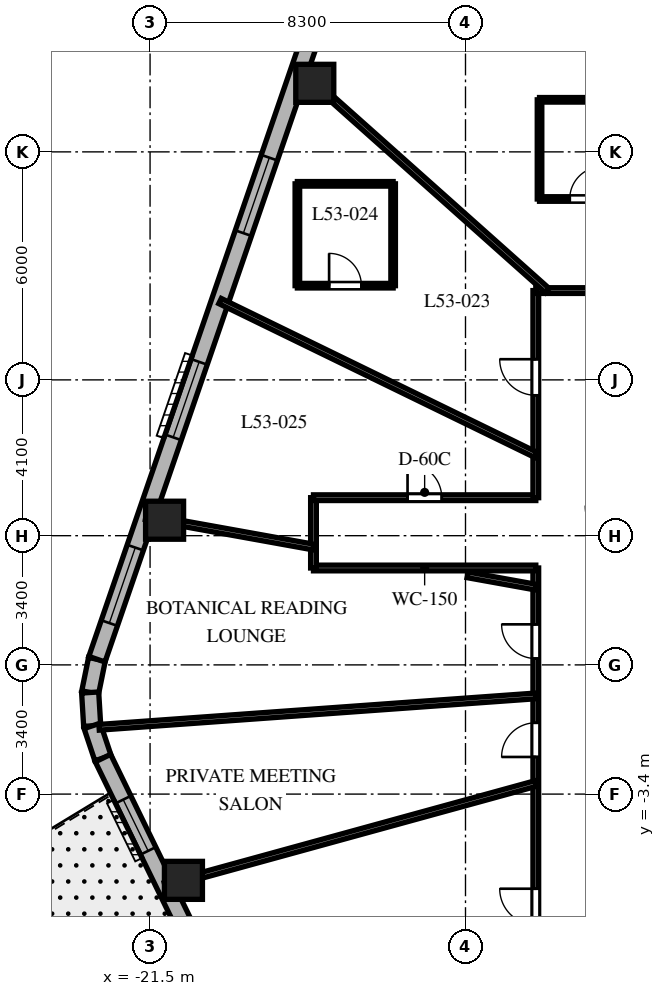
"""IFC4 building model, lengths in metres.
Left out: names, types, materials, properties, quantities, classifications, styles, units other than length and angle.
Written with IfcOpenShell. Run it as: python <this file> out.ifc"""

import sys

from ifc_helpers import new_model, si_unit, direction, frame, frame_2d, origin, origin_2d, place, context, subcontext, project, spatial, rectangle, extrude, element, fill, save


model = new_model("IFC4")
c1 = context("Model", 3, precision=1e-05, world=origin(), true_north=direction((0.0, 1.0)))
c2 = subcontext(c1, "Body", "Model", "MODEL_VIEW")
j1 = project(units=[si_unit("LENGTHUNIT", "METRE"), si_unit("PLANEANGLEUNIT", "RADIAN")], contexts=[c1])
p1 = place(None, origin())
s1 = spatial("IfcSite", under=j1, at=p1, CompositionType="ELEMENT")
p2 = place(p1, origin())
s2 = spatial("IfcBuilding", under=s1, at=p2, CompositionType="ELEMENT")
p3 = place(p2, frame((0.0, 0.0, 214.1)))
s3 = spatial("IfcBuildingStorey", under=s2, at=p3, CompositionType="ELEMENT", Elevation=214.1)
for number, where, z_axis, x_axis in (
    (1, (-17.166, 15.304, 0.0), (0.0, 0.0, 1.0), (1.0, 0.0, 0.0)),
    (2, (-21.118, 3.807, 0.0), (0.0, 0.0, 1.0), (1.0, 0.0, 0.0)),
    (3, (-20.622, -5.67, 0.0), (0.0, 0.0, 1.0), (1.0, 0.0, 0.0)),
):
    element("IfcColumn", number, at=place(p3, frame(where, z_axis=z_axis, x_axis=x_axis)), inside=s3, PredefinedType="COLUMN", context=c2, shape_type="SweptSolid", body=[
        extrude(rectangle(XDim=1.0, YDim=1.0, at=origin_2d()), origin(), (0.0, 0.0, 1.0), 3.8),
    ])
p4 = place(p3, frame((-22.898, 0.15, 0.0), z_axis=(0.0, 0.0, 1.0), x_axis=(-0.199055826889, -0.979988151858, 0.0)))
e4 = element("IfcWall", 4, at=p4, inside=s3, PredefinedType="SOLIDWALL", context=c2, shape_type="SweptSolid", body=[
    extrude(rectangle(XDim=0.894, YDim=0.45, at=frame_2d((0.447, 0.0))), origin(), (0.0, 0.0, 1.0), 3.5),
])
p5 = place(p3, frame((-23.076, -0.727, 0.0), z_axis=(0.0, 0.0, 1.0), x_axis=(0.060805222108, -0.998149650586, 0.0)))
e5 = element("IfcWall", 5, at=p5, inside=s3, PredefinedType="SOLIDWALL", context=c2, shape_type="SweptSolid", body=[
    extrude(rectangle(XDim=0.879, YDim=0.45, at=frame_2d((0.44, 0.0))), origin(), (0.0, 0.0, 1.0), 3.5),
])
p6 = place(p3, frame((-23.023, -1.604, 0.0), z_axis=(0.0, 0.0, 1.0), x_axis=(0.316801227695, -0.948491951537, 0.0)))
e6 = element("IfcWall", 6, at=p6, inside=s3, PredefinedType="SOLIDWALL", context=c2, shape_type="SweptSolid", body=[
    extrude(rectangle(XDim=0.894, YDim=0.45, at=frame_2d((0.447, 0.0))), origin(), (0.0, 0.0, 1.0), 3.5),
])
p7 = place(p3, frame((-16.324, 19.275, 0.0), z_axis=(0.0, 0.0, 1.0), x_axis=(-0.325083142304, -0.945685439557, 0.0)))
e7 = element("IfcWall", 7, at=p7, inside=s3, PredefinedType="SOLIDWALL", context=c2, shape_type="SweptSolid", body=[
    extrude(rectangle(XDim=20.224, YDim=0.45, at=frame_2d((10.112, 0.0))), origin(), (0.0, 0.0, 1.0), 3.5),
])
p8 = place(p7, frame((0.953, 0.0, 0.8)))
e8 = element("IfcOpeningElement", 8, at=p8, cuts=e7, PredefinedType="OPENING", context=c2, shape_type="SweptSolid", body=[
    extrude(rectangle(XDim=2.1, YDim=1.85, at=frame_2d((1.05, 0.925))), frame((0.0, 0.235, 0.0), z_axis=(0.0, -1.0, 0.0), x_axis=(1.0, 0.0, 0.0)), (0.0, 0.0, 1.0), 0.47),
])
p9 = place(p7, frame((6.268, 0.0, 0.8)))
e9 = element("IfcOpeningElement", 9, at=p9, cuts=e7, PredefinedType="OPENING", context=c2, shape_type="SweptSolid", body=[
    extrude(rectangle(XDim=2.1, YDim=1.85, at=frame_2d((1.05, 0.925))), frame((0.0, 0.235, 0.0), z_axis=(0.0, -1.0, 0.0), x_axis=(1.0, 0.0, 0.0)), (0.0, 0.0, 1.0), 0.47),
])
p10 = place(p7, frame((11.95, 0.0, 0.8)))
e10 = element("IfcOpeningElement", 10, at=p10, cuts=e7, PredefinedType="OPENING", context=c2, shape_type="SweptSolid", body=[
    extrude(rectangle(XDim=2.1, YDim=1.85, at=frame_2d((1.05, 0.925))), frame((0.0, 0.235, 0.0), z_axis=(0.0, -1.0, 0.0), x_axis=(1.0, 0.0, 0.0)), (0.0, 0.0, 1.0), 0.47),
])
p11 = place(p7, frame((17.118, 0.0, 0.8)))
e11 = element("IfcOpeningElement", 11, at=p11, cuts=e7, PredefinedType="OPENING", context=c2, shape_type="SweptSolid", body=[
    extrude(rectangle(XDim=2.1, YDim=1.85, at=frame_2d((1.05, 0.925))), frame((0.0, 0.235, 0.0), z_axis=(0.0, -1.0, 0.0), x_axis=(1.0, 0.0, 0.0)), (0.0, 0.0, 1.0), 0.47),
])
p12 = place(p3, frame((-22.74, -2.452, 0.0), z_axis=(0.0, 0.0, 1.0), x_axis=(0.437753424814, -0.899095066755, 0.0)))
e12 = element("IfcWall", 12, at=p12, inside=s3, PredefinedType="SOLIDWALL", context=c2, shape_type="SweptSolid", body=[
    extrude(rectangle(XDim=19.137, YDim=0.45, at=frame_2d((9.569, 0.0))), origin(), (0.0, 0.0, 1.0), 3.5),
])
p13 = place(p12, frame((4.763, 0.0, 0.0)))
e13 = element("IfcOpeningElement", 13, at=p13, cuts=e12, PredefinedType="OPENING", context=c2, shape_type="SweptSolid", body=[
    extrude(rectangle(XDim=0.95, YDim=2.15, at=frame_2d((0.475, 1.075))), frame((0.0, 0.235, 0.0), z_axis=(0.0, -1.0, 0.0), x_axis=(1.0, 0.0, 0.0)), (0.0, 0.0, 1.0), 0.47),
])
p14 = place(p12, frame((1.216, 0.0, 0.8)))
e14 = element("IfcOpeningElement", 14, at=p14, cuts=e12, PredefinedType="OPENING", context=c2, shape_type="SweptSolid", body=[
    extrude(rectangle(XDim=1.5, YDim=1.8, at=frame_2d((0.75, 0.9))), frame((0.0, 0.235, 0.0), z_axis=(0.0, -1.0, 0.0), x_axis=(1.0, 0.0, 0.0)), (0.0, 0.0, 1.0), 0.47),
])
p15 = place(p12, frame((8.87, 0.0, 0.8)))
e15 = element("IfcOpeningElement", 15, at=p15, cuts=e12, PredefinedType="OPENING", context=c2, shape_type="SweptSolid", body=[
    extrude(rectangle(XDim=1.5, YDim=1.8, at=frame_2d((0.75, 0.9))), frame((0.0, 0.235, 0.0), z_axis=(0.0, -1.0, 0.0), x_axis=(1.0, 0.0, 0.0)), (0.0, 0.0, 1.0), 0.47),
])
p16 = place(p12, frame((16.473, 0.0, 0.8)))
e16 = element("IfcOpeningElement", 16, at=p16, cuts=e12, PredefinedType="OPENING", context=c2, shape_type="SweptSolid", body=[
    extrude(rectangle(XDim=1.5, YDim=1.8, at=frame_2d((0.75, 0.9))), frame((0.0, 0.235, 0.0), z_axis=(0.0, -1.0, 0.0), x_axis=(1.0, 0.0, 0.0)), (0.0, 0.0, 1.0), 0.47),
])
p17 = place(p3, frame((-11.35, -9.85, 0.0), z_axis=(0.0, 0.0, 1.0), x_axis=(0.0, 1.0, 0.0)))
e17 = element("IfcWall", 17, at=p17, inside=s3, PredefinedType="PARTITIONING", context=c2, shape_type="SweptSolid", body=[
    extrude(rectangle(XDim=12.4, YDim=0.15, at=frame_2d((6.2, 0.0))), origin(), (0.0, 0.0, 1.0), 2.99),
])
p18 = place(p17, frame((10.017, 0.0, 0.0)))
e18 = element("IfcOpeningElement", 18, at=p18, cuts=e17, PredefinedType="OPENING", context=c2, shape_type="SweptSolid", body=[
    extrude(rectangle(XDim=0.9, YDim=2.03, at=frame_2d((0.45, 1.015))), frame((0.0, 0.085, 0.0), z_axis=(0.0, -1.0, 0.0), x_axis=(1.0, 0.0, 0.0)), (0.0, 0.0, 1.0), 0.17),
])
p19 = place(p17, frame((7.427, 0.0, 0.0)))
e19 = element("IfcOpeningElement", 19, at=p19, cuts=e17, PredefinedType="OPENING", context=c2, shape_type="SweptSolid", body=[
    extrude(rectangle(XDim=0.9, YDim=2.03, at=frame_2d((0.45, 1.015))), frame((0.0, 0.085, 0.0), z_axis=(0.0, -1.0, 0.0), x_axis=(1.0, 0.0, 0.0)), (0.0, 0.0, 1.0), 0.17),
])
p20 = place(p17, frame((3.01, 0.0, 0.0)))
e20 = element("IfcOpeningElement", 20, at=p20, cuts=e17, PredefinedType="OPENING", context=c2, shape_type="SweptSolid", body=[
    extrude(rectangle(XDim=0.95, YDim=2.03, at=frame_2d((0.475, 1.015))), frame((0.0, 0.085, 0.0), z_axis=(0.0, -1.0, 0.0), x_axis=(1.0, 0.0, 0.0)), (0.0, 0.0, 1.0), 0.17),
])
p21 = place(p3, frame((-11.35, 2.55, 0.0), z_axis=(0.0, 0.0, 1.0), x_axis=(-1.0, 0.0, 0.0)))
e21 = element("IfcWall", 21, at=p21, inside=s3, PredefinedType="PARTITIONING", context=c2, shape_type="SweptSolid", body=[
    extrude(rectangle(XDim=5.85, YDim=0.15, at=frame_2d((2.925, 0.0))), origin(), (0.0, 0.0, 1.0), 2.94),
])
p22 = place(p3, frame((-17.2, 2.55, 0.0), z_axis=(0.0, 0.0, 1.0), x_axis=(0.0, 1.0, 0.0)))
e22 = element("IfcWall", 22, at=p22, inside=s3, PredefinedType="PARTITIONING", context=c2, shape_type="SweptSolid", body=[
    extrude(rectangle(XDim=1.85, YDim=0.15, at=frame_2d((0.925, 0.0))), origin(), (0.0, 0.0, 1.0), 2.94),
])
p23 = place(p3, frame((-17.2, 4.4, 0.0), z_axis=(0.0, 0.0, 1.0), x_axis=(1.0, 0.0, 0.0)))
e23 = element("IfcWall", 23, at=p23, inside=s3, PredefinedType="PARTITIONING", context=c2, shape_type="SweptSolid", body=[
    extrude(rectangle(XDim=5.85, YDim=0.15, at=frame_2d((2.925, 0.0))), origin(), (0.0, 0.0, 1.0), 2.94),
])
p24 = place(p23, frame((2.475, 0.0, 0.0)))
e24 = element("IfcOpeningElement", 24, at=p24, cuts=e23, PredefinedType="OPENING", context=c2, shape_type="SweptSolid", body=[
    extrude(rectangle(XDim=0.9, YDim=2.03, at=frame_2d((0.45, 1.015))), frame((0.0, 0.085, 0.0), z_axis=(0.0, -1.0, 0.0), x_axis=(1.0, 0.0, 0.0)), (0.0, 0.0, 1.0), 0.17),
])
p25 = place(p3, frame((-11.35, 4.4, 0.0), z_axis=(0.0, 0.0, 1.0), x_axis=(0.0, 1.0, 0.0)))
e25 = element("IfcWall", 25, at=p25, inside=s3, PredefinedType="PARTITIONING", context=c2, shape_type="SweptSolid", body=[
    extrude(rectangle(XDim=5.45, YDim=0.15, at=frame_2d((2.725, 0.0))), origin(), (0.0, 0.0, 1.0), 2.99),
])
p26 = place(p25, frame((2.694, 0.0, 0.0)))
e26 = element("IfcOpeningElement", 26, at=p26, cuts=e25, PredefinedType="OPENING", context=c2, shape_type="SweptSolid", body=[
    extrude(rectangle(XDim=0.95, YDim=2.03, at=frame_2d((0.475, 1.015))), frame((0.0, 0.085, 0.0), z_axis=(0.0, -1.0, 0.0), x_axis=(1.0, 0.0, 0.0)), (0.0, 0.0, 1.0), 0.17),
])
p27 = place(p3, frame((-11.35, 9.85, 0.0), z_axis=(0.0, 0.0, 1.0), x_axis=(1.0, 0.0, 0.0)))
e27 = element("IfcWall", 27, at=p27, inside=s3, PredefinedType="PARTITIONING", context=c2, shape_type="SweptSolid", body=[
    extrude(rectangle(XDim=10.43, YDim=0.15, at=frame_2d((5.215, 0.0))), origin(), (0.0, 0.0, 1.0), 2.99),
])
p28 = place(p27, frame((8.362, 0.0, 0.0)))
e28 = element("IfcOpeningElement", 28, at=p28, cuts=e27, PredefinedType="OPENING", context=c2, shape_type="SweptSolid", body=[
    extrude(rectangle(XDim=0.95, YDim=2.03, at=frame_2d((0.475, 1.015))), frame((0.0, 0.085, 0.0), z_axis=(0.0, -1.0, 0.0), x_axis=(1.0, 0.0, 0.0)), (0.0, 0.0, 1.0), 0.17),
])
p29 = place(p27, frame((3.396, 0.0, 0.0)))
e29 = element("IfcOpeningElement", 29, at=p29, cuts=e27, PredefinedType="OPENING", context=c2, shape_type="SweptSolid", body=[
    extrude(rectangle(XDim=0.95, YDim=2.03, at=frame_2d((0.475, 1.015))), frame((0.0, 0.085, 0.0), z_axis=(0.0, -1.0, 0.0), x_axis=(1.0, 0.0, 0.0)), (0.0, 0.0, 1.0), 0.17),
])
p30 = place(p3, frame((-11.048, 9.85, 0.0), z_axis=(0.0, 0.0, 1.0), x_axis=(-0.746444434655, 0.665447748492, 0.0)))
e30 = element("IfcWall", 30, at=p30, inside=s3, PredefinedType="PARTITIONING", context=c2, shape_type="SweptSolid", body=[
    extrude(rectangle(XDim=8.732, YDim=0.15, at=frame_2d((4.366, 0.0))), origin(), (0.0, 0.0, 1.0), 2.74),
])
p31 = place(p3, frame((-11.35, 5.528, 0.0), z_axis=(0.0, 0.0, 1.0), x_axis=(-0.899038669565, 0.437869239188, 0.0)))
e31 = element("IfcWall", 31, at=p31, inside=s3, PredefinedType="PARTITIONING", context=c2, shape_type="SweptSolid", body=[
    extrude(rectangle(XDim=9.242, YDim=0.15, at=frame_2d((4.621, 0.0))), origin(), (0.0, 0.0, 1.0), 2.74),
])
p32 = place(p3, frame((-11.35, 2.046, 0.0), z_axis=(0.0, 0.0, 1.0), x_axis=(-0.984127783205, 0.177461281195, 0.0)))
e32 = element("IfcWall", 32, at=p32, inside=s3, PredefinedType="PARTITIONING", context=c2, shape_type="SweptSolid", body=[
    extrude(rectangle(XDim=1.826, YDim=0.15, at=frame_2d((0.913, 0.0))), origin(), (0.0, 0.0, 1.0), 3.5),
])
p33 = place(p3, frame((-17.2, 3.101, 0.0), z_axis=(0.0, 0.0, 1.0), x_axis=(-0.98413465883, 0.177423147559, 0.0)))
e33 = element("IfcWall", 33, at=p33, inside=s3, PredefinedType="PARTITIONING", context=c2, shape_type="SweptSolid", body=[
    extrude(rectangle(XDim=4.482, YDim=0.15, at=frame_2d((2.241, 0.0))), origin(), (0.0, 0.0, 1.0), 2.74),
])
p34 = place(p3, frame((-11.35, -0.816, 0.0), z_axis=(0.0, 0.0, 1.0), x_axis=(-0.997425460629, -0.071710881252, 0.0)))
e34 = element("IfcWall", 34, at=p34, inside=s3, PredefinedType="PARTITIONING", context=c2, shape_type="SweptSolid", body=[
    extrude(rectangle(XDim=11.521, YDim=0.15, at=frame_2d((5.76, 0.0))), origin(), (0.0, 0.0, 1.0), 2.74),
])
p35 = place(p3, frame((-11.35, -3.121, 0.0), z_axis=(0.0, 0.0, 1.0), x_axis=(-0.964212793822, -0.265129568758, 0.0)))
e35 = element("IfcWall", 35, at=p35, inside=s3, PredefinedType="PARTITIONING", context=c2, shape_type="SweptSolid", body=[
    extrude(rectangle(XDim=10.12, YDim=0.15, at=frame_2d((5.06, 0.0))), origin(), (0.0, 0.0, 1.0), 2.74),
])
p36 = place(p3, frame((-11.252, 12.26, 0.0), z_axis=(0.0, 0.0, 1.0), x_axis=(1.0, 0.0, 0.0)))
e36 = element("IfcWall", 36, at=p36, inside=s3, PredefinedType="PARTITIONING", context=c2, shape_type="SweptSolid", body=[
    extrude(rectangle(XDim=2.44, YDim=0.12, at=frame_2d((1.22, 0.0))), origin(), (0.0, 0.0, 1.0), 3.072),
])
p37 = place(p36, frame((0.795, 0.0, 0.0)))
e37 = element("IfcOpeningElement", 37, at=p37, cuts=e36, PredefinedType="OPENING", context=c2, shape_type="SweptSolid", body=[
    extrude(rectangle(XDim=0.85, YDim=2.03, at=frame_2d((0.425, 1.015))), frame((0.0, 0.07, 0.0), z_axis=(0.0, -1.0, 0.0), x_axis=(1.0, 0.0, 0.0)), (0.0, 0.0, 1.0), 0.14),
])
p38 = place(p3, frame((-8.812, 14.87, 0.0), z_axis=(0.0, 0.0, 1.0), x_axis=(-1.0, 0.0, 0.0)))
e38 = element("IfcWall", 38, at=p38, inside=s3, PredefinedType="PARTITIONING", context=c2, shape_type="SweptSolid", body=[
    extrude(rectangle(XDim=2.44, YDim=0.12, at=frame_2d((1.22, 0.0))), origin(), (0.0, 0.0, 1.0), 3.026),
])
p39 = place(p3, frame((-11.252, 14.87, 0.0), z_axis=(0.0, 0.0, 1.0), x_axis=(0.0, -1.0, 0.0)))
e39 = element("IfcWall", 39, at=p39, inside=s3, PredefinedType="PARTITIONING", context=c2, shape_type="SweptSolid", body=[
    extrude(rectangle(XDim=2.61, YDim=0.12, at=frame_2d((1.305, 0.0))), origin(), (0.0, 0.0, 1.0), 3.026),
])
p40 = place(p3, frame((-17.624, 9.979, 0.0), z_axis=(0.0, 0.0, 1.0), x_axis=(1.0, 0.0, 0.0)))
e40 = element("IfcWall", 40, at=p40, inside=s3, PredefinedType="PARTITIONING", context=c2, shape_type="SweptSolid", body=[
    extrude(rectangle(XDim=2.52, YDim=0.12, at=frame_2d((1.26, 0.0))), origin(), (0.0, 0.0, 1.0), 3.072),
])
p41 = place(p40, frame((0.835, 0.0, 0.0)))
e41 = element("IfcOpeningElement", 41, at=p41, cuts=e40, PredefinedType="OPENING", context=c2, shape_type="SweptSolid", body=[
    extrude(rectangle(XDim=0.85, YDim=2.03, at=frame_2d((0.425, 1.015))), frame((0.0, 0.07, 0.0), z_axis=(0.0, -1.0, 0.0), x_axis=(1.0, 0.0, 0.0)), (0.0, 0.0, 1.0), 0.14),
])
p42 = place(p3, frame((-15.104, 9.979, 0.0), z_axis=(0.0, 0.0, 1.0), x_axis=(0.0, 1.0, 0.0)))
e42 = element("IfcWall", 42, at=p42, inside=s3, PredefinedType="PARTITIONING", context=c2, shape_type="SweptSolid", body=[
    extrude(rectangle(XDim=2.68, YDim=0.12, at=frame_2d((1.34, 0.0))), origin(), (0.0, 0.0, 1.0), 3.072),
])
p43 = place(p3, frame((-15.104, 12.659, 0.0), z_axis=(0.0, 0.0, 1.0), x_axis=(-1.0, 0.0, 0.0)))
e43 = element("IfcWall", 43, at=p43, inside=s3, PredefinedType="PARTITIONING", context=c2, shape_type="SweptSolid", body=[
    extrude(rectangle(XDim=2.52, YDim=0.12, at=frame_2d((1.26, 0.0))), origin(), (0.0, 0.0, 1.0), 3.5),
])
p44 = place(p3, frame((-17.624, 12.659, 0.0), z_axis=(0.0, 0.0, 1.0), x_axis=(0.0, -1.0, 0.0)))
e44 = element("IfcWall", 44, at=p44, inside=s3, PredefinedType="PARTITIONING", context=c2, shape_type="SweptSolid", body=[
    extrude(rectangle(XDim=2.68, YDim=0.12, at=frame_2d((1.34, 0.0))), origin(), (0.0, 0.0, 1.0), 3.5),
])
p45 = place(p9, origin())
e45 = element("IfcWindow", 45, at=p45, inside=s3, PartitioningType="SINGLE_PANEL", PredefinedType="WINDOW", context=c2, shape_type="SweptSolid", body=[
    extrude(rectangle(XDim=2.1, YDim=1.85, at=frame_2d((1.05, 0.925))), frame((0.0, 0.03, 0.0), z_axis=(0.0, -1.0, 0.0), x_axis=(1.0, 0.0, 0.0)), (0.0, 0.0, 1.0), 0.06),
])
fill(e9, e45)
p46 = place(p10, origin())
e46 = element("IfcWindow", 46, at=p46, inside=s3, PartitioningType="SINGLE_PANEL", PredefinedType="WINDOW", context=c2, shape_type="SweptSolid", body=[
    extrude(rectangle(XDim=2.1, YDim=1.85, at=frame_2d((1.05, 0.925))), frame((0.0, 0.03, 0.0), z_axis=(0.0, -1.0, 0.0), x_axis=(1.0, 0.0, 0.0)), (0.0, 0.0, 1.0), 0.06),
])
fill(e10, e46)
p47 = place(p11, origin())
e47 = element("IfcWindow", 47, at=p47, inside=s3, PartitioningType="SINGLE_PANEL", PredefinedType="WINDOW", context=c2, shape_type="SweptSolid", body=[
    extrude(rectangle(XDim=2.1, YDim=1.85, at=frame_2d((1.05, 0.925))), frame((0.0, 0.03, 0.0), z_axis=(0.0, -1.0, 0.0), x_axis=(1.0, 0.0, 0.0)), (0.0, 0.0, 1.0), 0.06),
])
fill(e11, e47)
p48 = place(p14, origin())
e48 = element("IfcWindow", 48, at=p48, inside=s3, PartitioningType="SINGLE_PANEL", PredefinedType="WINDOW", context=c2, shape_type="SweptSolid", body=[
    extrude(rectangle(XDim=1.5, YDim=1.8, at=frame_2d((0.75, 0.9))), frame((0.0, 0.03, 0.0), z_axis=(0.0, -1.0, 0.0), x_axis=(1.0, 0.0, 0.0)), (0.0, 0.0, 1.0), 0.06),
])
fill(e14, e48)
p49 = place(p37, origin())
e49 = element("IfcDoor", 49, at=p49, inside=s3, OperationType="SINGLE_SWING_RIGHT", PredefinedType="DOOR", context=c2, shape_type="SweptSolid", body=[
    extrude(rectangle(XDim=0.85, YDim=2.03, at=frame_2d((0.425, 1.015))), frame((0.0, 0.025, 0.0), z_axis=(0.0, -1.0, 0.0), x_axis=(1.0, 0.0, 0.0)), (0.0, 0.0, 1.0), 0.05),
])
fill(e37, e49)
p50 = place(p26, origin())
e50 = element("IfcDoor", 50, at=p50, inside=s3, OperationType="SINGLE_SWING_RIGHT", PredefinedType="DOOR", context=c2, shape_type="SweptSolid", body=[
    extrude(rectangle(XDim=0.95, YDim=2.03, at=frame_2d((0.475, 1.015))), frame((0.0, 0.025, 0.0), z_axis=(0.0, -1.0, 0.0), x_axis=(1.0, 0.0, 0.0)), (0.0, 0.0, 1.0), 0.05),
])
fill(e26, e50)
p51 = place(p41, origin())
e51 = element("IfcDoor", 51, at=p51, inside=s3, OperationType="SINGLE_SWING_LEFT", PredefinedType="DOOR", context=c2, shape_type="SweptSolid", body=[
    extrude(rectangle(XDim=0.85, YDim=2.03, at=frame_2d((0.425, 1.015))), frame((0.0, 0.025, 0.0), z_axis=(0.0, -1.0, 0.0), x_axis=(1.0, 0.0, 0.0)), (0.0, 0.0, 1.0), 0.05),
])
fill(e41, e51)
p52 = place(p24, origin())
e52 = element("IfcDoor", 52, at=p52, inside=s3, OperationType="SINGLE_SWING_LEFT", PredefinedType="DOOR", context=c2, shape_type="SweptSolid", body=[
    extrude(rectangle(XDim=0.9, YDim=2.03, at=frame_2d((0.45, 1.015))), frame((0.0, 0.025, 0.0), z_axis=(0.0, -1.0, 0.0), x_axis=(1.0, 0.0, 0.0)), (0.0, 0.0, 1.0), 0.05),
])
fill(e24, e52)
p53 = place(p18, origin())
e53 = element("IfcDoor", 53, at=p53, inside=s3, OperationType="SINGLE_SWING_RIGHT", PredefinedType="DOOR", context=c2, shape_type="SweptSolid", body=[
    extrude(rectangle(XDim=0.9, YDim=2.03, at=frame_2d((0.45, 1.015))), frame((0.0, 0.025, 0.0), z_axis=(0.0, -1.0, 0.0), x_axis=(1.0, 0.0, 0.0)), (0.0, 0.0, 1.0), 0.05),
])
fill(e18, e53)
p54 = place(p19, origin())
e54 = element("IfcDoor", 54, at=p54, inside=s3, OperationType="SINGLE_SWING_LEFT", PredefinedType="DOOR", context=c2, shape_type="SweptSolid", body=[
    extrude(rectangle(XDim=0.9, YDim=2.03, at=frame_2d((0.45, 1.015))), frame((0.0, 0.025, 0.0), z_axis=(0.0, -1.0, 0.0), x_axis=(1.0, 0.0, 0.0)), (0.0, 0.0, 1.0), 0.05),
])
fill(e19, e54)
p55 = place(p20, origin())
e55 = element("IfcDoor", 55, at=p55, inside=s3, OperationType="SINGLE_SWING_RIGHT", PredefinedType="DOOR", context=c2, shape_type="SweptSolid", body=[
    extrude(rectangle(XDim=0.95, YDim=2.03, at=frame_2d((0.475, 1.015))), frame((0.0, 0.025, 0.0), z_axis=(0.0, -1.0, 0.0), x_axis=(1.0, 0.0, 0.0)), (0.0, 0.0, 1.0), 0.05),
])
fill(e20, e55)
save(model, sys.argv[1])
